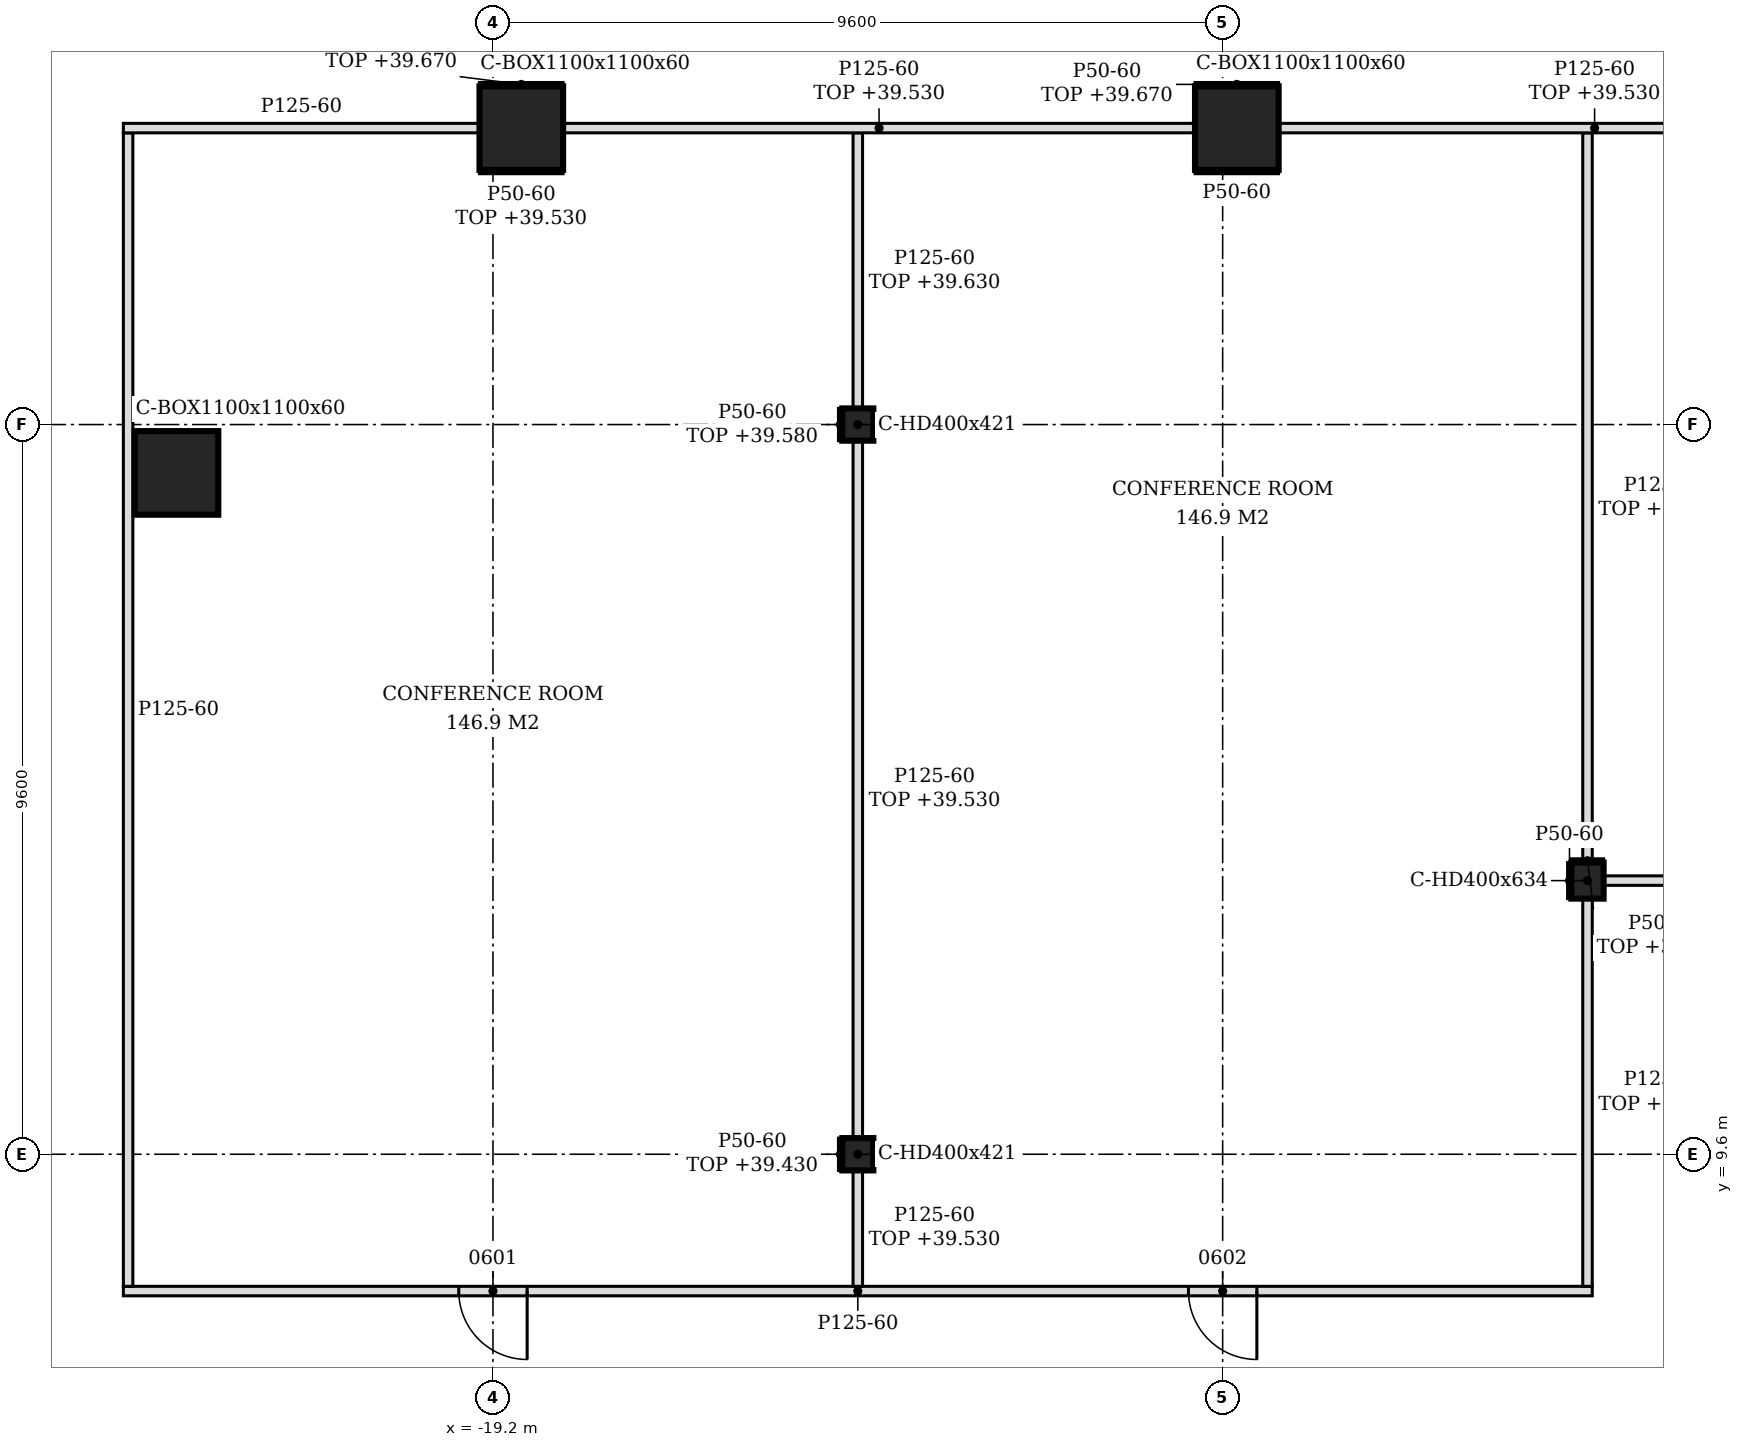
"""IFC4 building model, lengths in metres.
Left out: names, types, materials, properties, quantities, classifications, styles, units other than length and angle.
Written with IfcOpenShell. Run it as: python <this file> out.ifc"""

import sys

from ifc_helpers import new_model, si_unit, direction, frame, frame_2d, origin, origin_2d, place, context, subcontext, project, spatial, polyline, rectangle, hollow_rectangle, i_section, outline, extrude, element, fill, save


model = new_model("IFC4")
c1 = context("Model", 3, precision=1e-05, world=origin(), true_north=direction((0.0, 1.0)))
c2 = subcontext(c1, "Body", "Model", "MODEL_VIEW")
j1 = project(units=[si_unit("LENGTHUNIT", "METRE"), si_unit("PLANEANGLEUNIT", "RADIAN")], contexts=[c1])
p1 = place(None, origin())
s1 = spatial("IfcSite", under=j1, at=p1, CompositionType="ELEMENT")
p2 = place(p1, origin())
s2 = spatial("IfcBuilding", under=s1, at=p2, CompositionType="ELEMENT")
p3 = place(p2, frame((0.0, 0.0, 35.4)))
s3 = spatial("IfcBuildingStorey", under=s2, at=p3, CompositionType="ELEMENT", Elevation=35.4)
for number, where, z_axis, x_axis in (
    (1, (-9.414, 23.1, -0.2), (0.0, 0.0, 1.0), (1.0, 0.0, 0.0)),
    (2, (-18.827, 23.1, -0.2), (0.0, 0.0, 1.0), (1.0, 0.0, 0.0)),
    (3, (-23.364, 18.564, -0.2), (0.0, 0.0, 1.0), (1.0, 0.0, 0.0)),
):
    element("IfcColumn", number, at=place(p3, frame(where, z_axis=z_axis, x_axis=x_axis)), inside=s3, PredefinedType="COLUMN", context=c2, shape_type="SweptSolid", body=[
        extrude(hollow_rectangle(XDim=1.1, YDim=1.1, WallThickness=0.06, at=origin_2d()), origin(), (0.0, 0.0, 1.0), 4.85),
    ])
p4 = place(p3, frame((-4.8, 13.2, -0.2), z_axis=(0.0, 0.0, 1.0), x_axis=(1.0, 0.0, 0.0)))
e4 = element("IfcColumn", 4, at=p4, inside=s3, PredefinedType="COLUMN", context=c2, shape_type="SweptSolid", body=[
    extrude(i_section(OverallWidth=0.424, OverallDepth=0.474, WebThickness=0.048, FlangeThickness=0.077, FilletRadius=0.015, at=origin_2d()), origin(), (0.0, 0.0, 1.0), 4.85),
])
for number, where, z_axis, x_axis in (
    (5, (-14.4, 9.6, -0.2), (0.0, 0.0, 1.0), (1.0, 0.0, 0.0)),
    (6, (-14.4, 19.2, -0.2), (0.0, 0.0, 1.0), (1.0, 0.0, 0.0)),
):
    element("IfcColumn", number, at=place(p3, frame(where, z_axis=z_axis, x_axis=x_axis)), inside=s3, PredefinedType="COLUMN", context=c2, shape_type="SweptSolid", body=[
        extrude(i_section(OverallWidth=0.409, OverallDepth=0.425, WebThickness=0.033, FlangeThickness=0.052, FilletRadius=0.015, at=origin_2d()), origin(), (0.0, 0.0, 1.0), 4.85),
    ])
p5 = place(p3, frame((-24.062, 7.8, 0.0), z_axis=(0.0, 0.0, 1.0), x_axis=(1.0, 0.0, 0.0)))
e7 = element("IfcWall", 7, at=p5, inside=s3, PredefinedType="PARTITIONING", context=c2, shape_type="SweptSolid", body=[
    extrude(outline(polyline([(0.0, 0.0), (19.325, 0.0), (19.325, 4.03), (19.113, 4.03), (19.111, 4.65), (9.812, 4.65), (9.811, 4.13), (9.512, 4.13), (9.51, 4.65), (0.0, 4.65), (0.0, 0.0)])), frame((0.0, 0.062, 0.0), z_axis=(0.0, -1.0, 0.0), x_axis=(1.0, 0.0, 0.0)), (0.0, 0.0, 1.0), 0.125),
])
p6 = place(p5, frame((4.413, 0.0, 0.0)))
e8 = element("IfcOpeningElement", 8, at=p6, cuts=e7, PredefinedType="OPENING", context=c2, shape_type="SweptSolid", body=[
    extrude(rectangle(XDim=0.9, YDim=2.1, at=frame_2d((0.45, 1.05))), frame((0.0, 0.073, 0.0), z_axis=(0.0, -1.0, 0.0), x_axis=(1.0, 0.0, 0.0)), (0.0, 0.0, 1.0), 0.145),
])
p7 = place(p5, frame((14.012, 0.0, 0.0)))
e9 = element("IfcOpeningElement", 9, at=p7, cuts=e7, PredefinedType="OPENING", context=c2, shape_type="SweptSolid", body=[
    extrude(rectangle(XDim=0.9, YDim=2.1, at=frame_2d((0.45, 1.05))), frame((0.0, 0.073, 0.0), z_axis=(0.0, -1.0, 0.0), x_axis=(1.0, 0.0, 0.0)), (0.0, 0.0, 1.0), 0.145),
])
p8 = place(p3, frame((-24.0, 7.863, 0.0), z_axis=(0.0, 0.0, 1.0), x_axis=(0.0, 1.0, 0.0)))
e10 = element("IfcWall", 10, at=p8, inside=s3, PredefinedType="PARTITIONING", context=c2, shape_type="SweptSolid", body=[
    extrude(outline(polyline([(0.0, 0.0), (15.175, 0.0), (15.175, 4.65), (11.488, 4.65), (11.486, 4.03), (11.188, 4.03), (11.186, 4.65), (10.339, 4.65), (10.337, 4.13), (9.79, 4.13), (9.788, 4.65), (6.647, 4.65), (6.646, 4.03), (6.427, 4.03), (6.426, 4.65), (1.847, 4.65), (1.845, 4.03), (1.627, 4.03), (1.625, 4.65), (0.0, 4.65), (0.0, 0.0)])), frame((0.0, 0.062, 0.0), z_axis=(0.0, -1.0, 0.0), x_axis=(1.0, 0.0, 0.0)), (0.0, 0.0, 1.0), 0.125),
])
p9 = place(p3, frame((-14.4, 7.863, 0.0), z_axis=(0.0, 0.0, 1.0), x_axis=(0.0, 1.0, 0.0)))
e11 = element("IfcWall", 11, at=p9, inside=s3, PredefinedType="PARTITIONING", context=c2, shape_type="SweptSolid", body=[
    extrude(rectangle(XDim=1.525, YDim=0.125, at=frame_2d((0.762, 0.0))), origin(), (0.0, 0.0, 1.0), 4.13),
])
p10 = place(p3, frame((-4.8, 7.863, 0.0), z_axis=(0.0, 0.0, 1.0), x_axis=(0.0, 1.0, 0.0)))
e12 = element("IfcWall", 12, at=p10, inside=s3, PredefinedType="PARTITIONING", context=c2, shape_type="SweptSolid", body=[
    extrude(rectangle(XDim=5.1, YDim=0.125, at=frame_2d((2.55, 0.0))), origin(), (0.0, 0.0, 1.0), 4.03),
])
p11 = place(p3, frame((-14.4, 9.812, 0.0), z_axis=(0.0, 0.0, 1.0), x_axis=(0.0, 1.0, 0.0)))
e13 = element("IfcWall", 13, at=p11, inside=s3, PredefinedType="PARTITIONING", context=c2, shape_type="SweptSolid", body=[
    extrude(rectangle(XDim=9.175, YDim=0.125, at=frame_2d((4.587, 0.0))), origin(), (0.0, 0.0, 1.0), 4.13),
])
p12 = place(p3, frame((-4.588, 13.2, 0.0), z_axis=(0.0, 0.0, 1.0), x_axis=(1.0, 0.0, 0.0)))
e14 = element("IfcWall", 14, at=p12, inside=s3, PredefinedType="PARTITIONING", context=c2, shape_type="SweptSolid", body=[
    extrude(rectangle(XDim=11.576, YDim=0.125, at=frame_2d((5.788, 0.0))), origin(), (0.0, 0.0, 1.0), 4.03),
])
p13 = place(p12, frame((5.993, 0.0, 0.0)))
e15 = element("IfcOpeningElement", 15, at=p13, cuts=e14, PredefinedType="OPENING", context=c2, shape_type="SweptSolid", body=[
    extrude(rectangle(XDim=1.8, YDim=2.1, at=frame_2d((0.9, 1.05))), frame((0.0, 0.073, 0.0), z_axis=(0.0, -1.0, 0.0), x_axis=(1.0, 0.0, 0.0)), (0.0, 0.0, 1.0), 0.145),
])
p14 = place(p3, frame((-4.8, 13.437, 0.0), z_axis=(0.0, 0.0, 1.0), x_axis=(0.0, 1.0, 0.0)))
e16 = element("IfcWall", 16, at=p14, inside=s3, PredefinedType="PARTITIONING", context=c2, shape_type="SweptSolid", body=[
    extrude(rectangle(XDim=9.601, YDim=0.125, at=frame_2d((4.8, 0.0))), origin(), (0.0, 0.0, 1.0), 4.13),
])
p15 = place(p3, frame((-14.4, 19.413, 0.0), z_axis=(0.0, 0.0, 1.0), x_axis=(0.0, 1.0, 0.0)))
e17 = element("IfcWall", 17, at=p15, inside=s3, PredefinedType="PARTITIONING", context=c2, shape_type="SweptSolid", body=[
    extrude(outline(polyline([(0.0, 0.0), (3.625, 0.0), (3.625, 4.13), (3.538, 4.13), (3.535, 4.23), (0.0, 4.23), (0.0, 0.0)])), frame((0.0, 0.062, 0.0), z_axis=(0.0, -1.0, 0.0), x_axis=(1.0, 0.0, 0.0)), (0.0, 0.0, 1.0), 0.125),
])
p16 = place(p3, frame((-24.062, 23.1, 0.0), z_axis=(0.0, 0.0, 1.0), x_axis=(1.0, 0.0, 0.0)))
e18 = element("IfcWall", 18, at=p16, inside=s3, PredefinedType="PARTITIONING", context=c2, shape_type="SweptSolid", body=[
    extrude(rectangle(XDim=4.685, YDim=0.125, at=frame_2d((2.343, 0.0))), origin(), (0.0, 0.0, 1.0), 4.65),
])
for number, where, z_axis, x_axis in (
    (19, (-18.277, 23.1, 0.0), (0.0, 0.0, 1.0), (1.0, 0.0, 0.0)),
    (20, (-8.864, 23.1, 0.0), (0.0, 0.0, 1.0), (1.0, 0.0, 0.0)),
):
    element("IfcWall", number, at=place(p3, frame(where, z_axis=z_axis, x_axis=x_axis)), inside=s3, PredefinedType="PARTITIONING", context=c2, shape_type="SweptSolid", body=[
        extrude(rectangle(XDim=8.313, YDim=0.125, at=frame_2d((4.157, 0.0))), origin(), (0.0, 0.0, 1.0), 4.13),
    ])
p17 = place(p3, frame((-14.629, 9.387, 0.0), z_axis=(0.0, 0.0, 1.0), x_axis=(0.0, 1.0, 0.0)))
e21 = element("IfcWall", 21, at=p17, inside=s3, PredefinedType="PARTITIONING", context=c2, shape_type="SweptSolid", body=[
    extrude(rectangle(XDim=0.425, YDim=0.05, at=frame_2d((0.212, 0.0))), origin(), (0.0, 0.0, 1.0), 4.03),
])
p18 = place(p3, frame((-14.629, 18.988, 0.0), z_axis=(0.0, 0.0, 1.0), x_axis=(0.0, 1.0, 0.0)))
e22 = element("IfcWall", 22, at=p18, inside=s3, PredefinedType="PARTITIONING", context=c2, shape_type="SweptSolid", body=[
    extrude(rectangle(XDim=0.425, YDim=0.05, at=frame_2d((0.212, 0.0))), origin(), (0.0, 0.0, 1.0), 4.18),
])
p19 = place(p3, frame((-5.037, 12.963, 0.0), z_axis=(0.0, 0.0, 1.0), x_axis=(0.0, 1.0, 0.0)))
e23 = element("IfcWall", 23, at=p19, inside=s3, PredefinedType="PARTITIONING", context=c2, shape_type="SweptSolid", body=[
    extrude(rectangle(XDim=0.474, YDim=0.05, at=frame_2d((0.237, 0.0))), origin(), (0.0, 0.0, 1.0), 4.65),
])
p20 = place(p3, frame((-5.012, 13.462, 0.0), z_axis=(0.0, 0.0, 1.0), x_axis=(1.0, 0.0, 0.0)))
e24 = element("IfcWall", 24, at=p20, inside=s3, PredefinedType="PARTITIONING", context=c2, shape_type="SweptSolid", body=[
    extrude(rectangle(XDim=0.424, YDim=0.05, at=frame_2d((0.212, 0.0))), origin(), (0.0, 0.0, 1.0), 4.13),
])
p21 = place(p3, frame((-19.377, 22.525, 0.0), z_axis=(0.0, 0.0, 1.0), x_axis=(1.0, 0.0, 0.0)))
e25 = element("IfcWall", 25, at=p21, inside=s3, PredefinedType="PARTITIONING", context=c2, shape_type="SweptSolid", body=[
    extrude(rectangle(XDim=1.1, YDim=0.05, at=frame_2d((0.55, 0.0))), origin(), (0.0, 0.0, 1.0), 4.13),
])
p22 = place(p3, frame((-19.377, 23.675, 0.0), z_axis=(0.0, 0.0, 1.0), x_axis=(1.0, 0.0, 0.0)))
e26 = element("IfcWall", 26, at=p22, inside=s3, PredefinedType="PARTITIONING", context=c2, shape_type="SweptSolid", body=[
    extrude(rectangle(XDim=1.1, YDim=0.05, at=frame_2d((0.55, 0.0))), origin(), (0.0, 0.0, 1.0), 4.27),
])
p23 = place(p3, frame((-9.964, 22.525, 0.0), z_axis=(0.0, 0.0, 1.0), x_axis=(1.0, 0.0, 0.0)))
e27 = element("IfcWall", 27, at=p23, inside=s3, PredefinedType="PARTITIONING", context=c2, shape_type="SweptSolid", body=[
    extrude(rectangle(XDim=1.1, YDim=0.05, at=frame_2d((0.55, 0.0))), origin(), (0.0, 0.0, 1.0), 4.65),
])
p24 = place(p3, frame((-9.964, 23.675, 0.0), z_axis=(0.0, 0.0, 1.0), x_axis=(1.0, 0.0, 0.0)))
e28 = element("IfcWall", 28, at=p24, inside=s3, PredefinedType="PARTITIONING", context=c2, shape_type="SweptSolid", body=[
    extrude(rectangle(XDim=1.1, YDim=0.05, at=frame_2d((0.55, 0.0))), origin(), (0.0, 0.0, 1.0), 4.27),
])
p25 = place(p6, frame((0.9, 0.0, 0.0), z_axis=(0.0, 0.0, 1.0), x_axis=(-1.0, 0.0, 0.0)))
e29 = element("IfcDoor", 29, at=p25, inside=s3, OperationType="SINGLE_SWING_LEFT", PredefinedType="DOOR", context=c2, shape_type="SweptSolid", body=[
    extrude(rectangle(XDim=0.9, YDim=2.1, at=frame_2d((0.45, 1.05))), frame((0.0, 0.025, 0.0), z_axis=(0.0, -1.0, 0.0), x_axis=(1.0, 0.0, 0.0)), (0.0, 0.0, 1.0), 0.05),
])
fill(e8, e29)
p26 = place(p7, frame((0.9, 0.0, 0.0), z_axis=(0.0, 0.0, 1.0), x_axis=(-1.0, 0.0, 0.0)))
e30 = element("IfcDoor", 30, at=p26, inside=s3, OperationType="SINGLE_SWING_LEFT", PredefinedType="DOOR", context=c2, shape_type="SweptSolid", body=[
    extrude(rectangle(XDim=0.9, YDim=2.1, at=frame_2d((0.45, 1.05))), frame((0.0, 0.025, 0.0), z_axis=(0.0, -1.0, 0.0), x_axis=(1.0, 0.0, 0.0)), (0.0, 0.0, 1.0), 0.05),
])
fill(e9, e30)
save(model, sys.argv[1])
